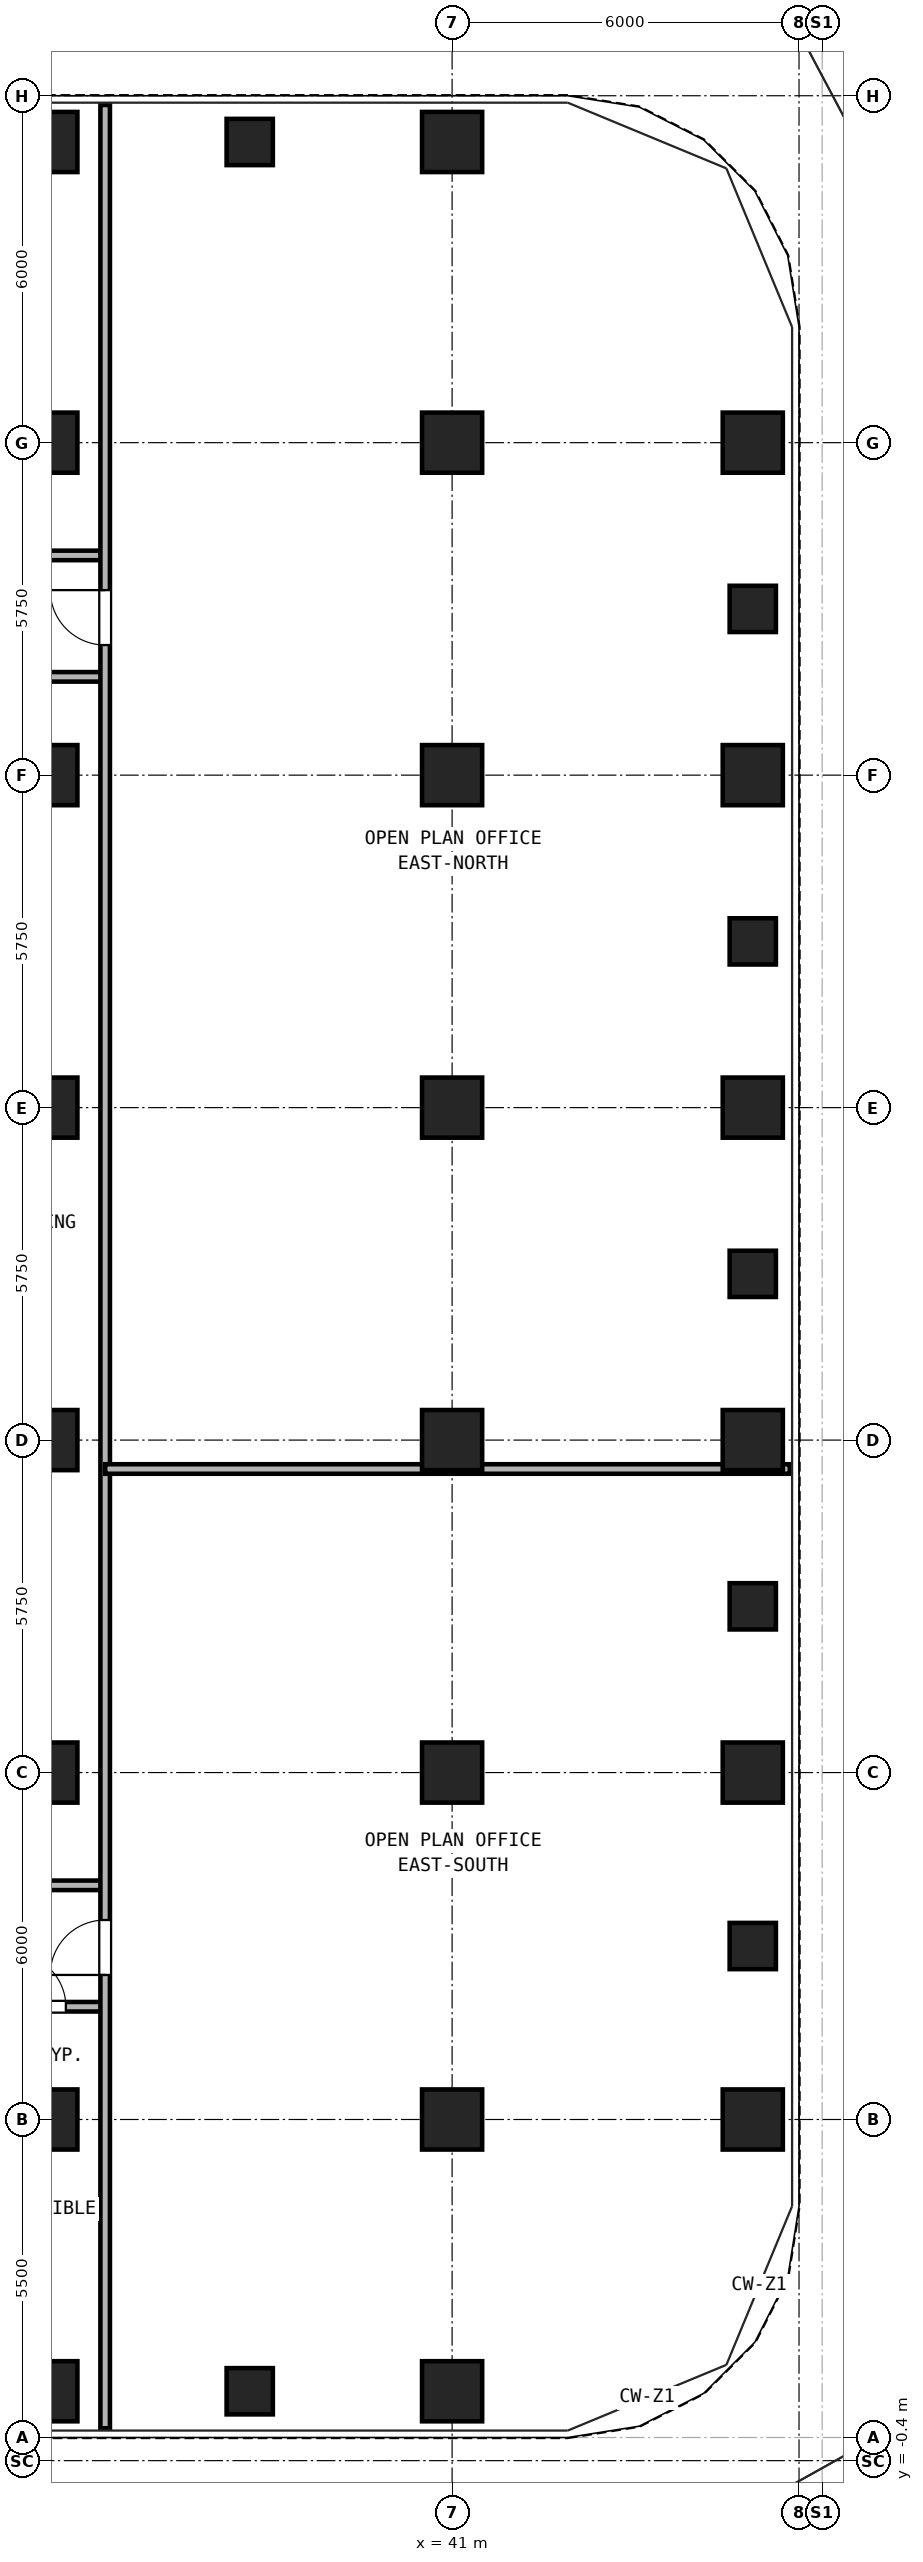
"""IFC4 building model, lengths in metres.
Left out: names, types, materials, properties, quantities, classifications, styles, units other than length and angle.
Written with IfcOpenShell. Run it as: python <this file> out.ifc"""

import sys

from ifc_helpers import new_model, si_unit, direction, frame, frame_2d, origin, origin_2d, place, context, subcontext, project, spatial, rectangle, hollow_rectangle, extrude, source, transform, mapped, element, fill, save


model = new_model("IFC4")
c1 = context("Model", 3, precision=1e-05, world=origin(), true_north=direction((0.0, 1.0)))
c2 = subcontext(c1, "Body", "Model", "MODEL_VIEW")
j1 = project(units=[si_unit("LENGTHUNIT", "METRE"), si_unit("PLANEANGLEUNIT", "RADIAN")], contexts=[c1])
p1 = place(None, origin())
s1 = spatial("IfcSite", under=j1, at=p1, CompositionType="ELEMENT")
p2 = place(p1, origin())
s2 = spatial("IfcBuilding", under=s1, at=p2, CompositionType="ELEMENT")
p3 = place(p2, frame((0.0, 0.0, 58.5)))
s3 = spatial("IfcBuildingStorey", under=s2, at=p3, CompositionType="ELEMENT", Elevation=58.5)
m1 = source(origin(), c2, "Body", "SweptSolid", [
    extrude(hollow_rectangle(XDim=1.04, YDim=1.04, WallThickness=0.065, at=origin_2d()), origin(), (0.0, 0.0, 1.0), 3.32),
])
for number, where, z_axis, x_axis in (
    (1, (34.0, 0.8, 0.0), (0.0, 0.0, 1.0), (1.0, 0.0, 0.0)),
    (2, (34.0, 39.7, 0.0), (0.0, 0.0, 1.0), (1.0, 0.0, 0.0)),
    (3, (41.0, 0.8, 0.0), (0.0, 0.0, 1.0), (1.0, 0.0, 0.0)),
    (4, (41.0, 39.7, 0.0), (0.0, 0.0, 1.0), (1.0, 0.0, 0.0)),
    (5, (46.2, 5.5, 0.0), (0.0, 0.0, 1.0), (1.0, 0.0, 0.0)),
    (6, (46.2, 11.5, 0.0), (0.0, 0.0, 1.0), (1.0, 0.0, 0.0)),
    (7, (46.2, 17.25, 0.0), (0.0, 0.0, 1.0), (1.0, 0.0, 0.0)),
    (8, (46.2, 23.0, 0.0), (0.0, 0.0, 1.0), (1.0, 0.0, 0.0)),
    (9, (46.2, 28.75, 0.0), (0.0, 0.0, 1.0), (1.0, 0.0, 0.0)),
    (10, (46.2, 34.5, 0.0), (0.0, 0.0, 1.0), (1.0, 0.0, 0.0)),
    (11, (34.0, 5.5, 0.0), (0.0, 0.0, 1.0), (1.0, 0.0, 0.0)),
    (12, (34.0, 11.5, 0.0), (0.0, 0.0, 1.0), (1.0, 0.0, 0.0)),
    (13, (34.0, 17.25, 0.0), (0.0, 0.0, 1.0), (1.0, 0.0, 0.0)),
    (14, (34.0, 23.0, 0.0), (0.0, 0.0, 1.0), (1.0, 0.0, 0.0)),
    (15, (34.0, 28.75, 0.0), (0.0, 0.0, 1.0), (1.0, 0.0, 0.0)),
    (16, (34.0, 34.5, 0.0), (0.0, 0.0, 1.0), (1.0, 0.0, 0.0)),
    (17, (41.0, 5.5, 0.0), (0.0, 0.0, 1.0), (1.0, 0.0, 0.0)),
    (18, (41.0, 11.5, 0.0), (0.0, 0.0, 1.0), (1.0, 0.0, 0.0)),
    (19, (41.0, 17.25, 0.0), (0.0, 0.0, 1.0), (1.0, 0.0, 0.0)),
    (20, (41.0, 23.0, 0.0), (0.0, 0.0, 1.0), (1.0, 0.0, 0.0)),
    (21, (41.0, 28.75, 0.0), (0.0, 0.0, 1.0), (1.0, 0.0, 0.0)),
    (22, (41.0, 34.5, 0.0), (0.0, 0.0, 1.0), (1.0, 0.0, 0.0)),
):
    element("IfcColumn", number, at=place(p3, frame(where, z_axis=z_axis, x_axis=x_axis)), inside=s3, PredefinedType="COLUMN", context=c2, shape_type="MappedRepresentation", body=[
        mapped(m1, transform((0.0, 0.0, 0.0), x_axis=(1.0, 0.0, 0.0), y_axis=(0.0, 1.0, 0.0), z_axis=(0.0, 0.0, 1.0), scale=1.0)),
    ])
m2 = source(origin(), c2, "Body", "SweptSolid", [
    extrude(hollow_rectangle(XDim=0.8, YDim=0.8, WallThickness=0.045, at=origin_2d()), origin(), (0.0, 0.0, 1.0), 3.32),
])
for number, where, z_axis, x_axis in (
    (23, (37.5, 0.8, 0.0), (0.0, 0.0, 1.0), (1.0, 0.0, 0.0)),
    (24, (37.5, 39.7, 0.0), (0.0, 0.0, 1.0), (1.0, 0.0, 0.0)),
    (25, (46.2, 8.5, 0.0), (0.0, 0.0, 1.0), (1.0, 0.0, 0.0)),
    (26, (46.2, 14.375, 0.0), (0.0, 0.0, 1.0), (1.0, 0.0, 0.0)),
    (27, (46.2, 20.125, 0.0), (0.0, 0.0, 1.0), (1.0, 0.0, 0.0)),
    (28, (46.2, 25.875, 0.0), (0.0, 0.0, 1.0), (1.0, 0.0, 0.0)),
    (29, (46.2, 31.625, 0.0), (0.0, 0.0, 1.0), (1.0, 0.0, 0.0)),
):
    element("IfcColumn", number, at=place(p3, frame(where, z_axis=z_axis, x_axis=x_axis)), inside=s3, PredefinedType="COLUMN", context=c2, shape_type="MappedRepresentation", body=[
        mapped(m2, transform((0.0, 0.0, 0.0), x_axis=(1.0, 0.0, 0.0), y_axis=(0.0, 1.0, 0.0), z_axis=(0.0, 0.0, 1.0), scale=1.0)),
    ])
p4 = place(p3, frame((12.0, 7.45, 0.0), z_axis=(0.0, 0.0, 1.0), x_axis=(1.0, 0.0, 0.0)))
e30 = element("IfcWall", 30, at=p4, inside=s3, PredefinedType="PARTITIONING", context=c2, shape_type="SweptSolid", body=[
    extrude(rectangle(XDim=23.0, YDim=0.165, at=frame_2d((11.5, 0.0))), origin(), (0.0, 0.0, 1.0), 3.32),
])
p5 = place(p4, frame((7.5, 0.0, 0.0)))
e31 = element("IfcOpeningElement", 31, at=p5, cuts=e30, PredefinedType="OPENING", context=c2, shape_type="SweptSolid", body=[
    extrude(rectangle(XDim=0.95, YDim=2.15, at=frame_2d((0.475, 1.075))), frame((0.0, 0.093, 0.0), z_axis=(0.0, -1.0, 0.0), x_axis=(1.0, 0.0, 0.0)), (0.0, 0.0, 1.0), 0.185),
])
p6 = place(p4, frame((17.9, 0.0, 0.0)))
e32 = element("IfcOpeningElement", 32, at=p6, cuts=e30, PredefinedType="OPENING", context=c2, shape_type="SweptSolid", body=[
    extrude(rectangle(XDim=0.95, YDim=2.15, at=frame_2d((0.475, 1.075))), frame((0.0, 0.093, 0.0), z_axis=(0.0, -1.0, 0.0), x_axis=(1.0, 0.0, 0.0)), (0.0, 0.0, 1.0), 0.185),
])
p7 = place(p4, frame((21.4, 0.0, 0.0)))
e33 = element("IfcOpeningElement", 33, at=p7, cuts=e30, PredefinedType="OPENING", context=c2, shape_type="SweptSolid", body=[
    extrude(rectangle(XDim=0.92, YDim=2.1, at=frame_2d((0.46, 1.05))), frame((0.0, 0.093, 0.0), z_axis=(0.0, -1.0, 0.0), x_axis=(1.0, 0.0, 0.0)), (0.0, 0.0, 1.0), 0.185),
])
p8 = place(p3, frame((12.0, 32.55, 0.0), z_axis=(0.0, 0.0, 1.0), x_axis=(1.0, 0.0, 0.0)))
e34 = element("IfcWall", 34, at=p8, inside=s3, PredefinedType="PARTITIONING", context=c2, shape_type="SweptSolid", body=[
    extrude(rectangle(XDim=23.0, YDim=0.165, at=frame_2d((11.5, 0.0))), origin(), (0.0, 0.0, 1.0), 3.32),
])
p9 = place(p8, frame((5.75, 0.0, 0.0)))
e35 = element("IfcOpeningElement", 35, at=p9, cuts=e34, PredefinedType="OPENING", context=c2, shape_type="SweptSolid", body=[
    extrude(rectangle(XDim=0.95, YDim=2.15, at=frame_2d((0.475, 1.075))), frame((0.0, 0.093, 0.0), z_axis=(0.0, -1.0, 0.0), x_axis=(1.0, 0.0, 0.0)), (0.0, 0.0, 1.0), 0.185),
])
p10 = place(p8, frame((17.25, 0.0, 0.0)))
e36 = element("IfcOpeningElement", 36, at=p10, cuts=e34, PredefinedType="OPENING", context=c2, shape_type="SweptSolid", body=[
    extrude(rectangle(XDim=0.95, YDim=2.15, at=frame_2d((0.475, 1.075))), frame((0.0, 0.093, 0.0), z_axis=(0.0, -1.0, 0.0), x_axis=(1.0, 0.0, 0.0)), (0.0, 0.0, 1.0), 0.185),
])
for number, where, z_axis, x_axis in (
    (37, (30.7, 9.55, 0.0), (0.0, 0.0, 1.0), (1.0, 0.0, 0.0)),
    (38, (30.7, 30.45, 0.0), (0.0, 0.0, 1.0), (1.0, 0.0, 0.0)),
):
    element("IfcWall", number, at=place(p3, frame(where, z_axis=z_axis, x_axis=x_axis)), inside=s3, PredefinedType="PARTITIONING", context=c2, shape_type="SweptSolid", body=[
        extrude(rectangle(XDim=4.3, YDim=0.165, at=frame_2d((2.15, 0.0))), origin(), (0.0, 0.0, 1.0), 3.32),
    ])
p11 = place(p3, frame((35.0, 0.16, 0.0), z_axis=(0.0, 0.0, 1.0), x_axis=(0.0, 1.0, 0.0)))
e39 = element("IfcWall", 39, at=p11, inside=s3, PredefinedType="PARTITIONING", context=c2, shape_type="SweptSolid", body=[
    extrude(rectangle(XDim=40.18, YDim=0.165, at=frame_2d((20.09, 0.0))), origin(), (0.0, 0.0, 1.0), 3.32),
])
p12 = place(p11, frame((7.84, 0.0, 0.0)))
e40 = element("IfcOpeningElement", 40, at=p12, cuts=e39, PredefinedType="OPENING", context=c2, shape_type="SweptSolid", body=[
    extrude(rectangle(XDim=0.95, YDim=2.15, at=frame_2d((0.475, 1.075))), frame((0.0, 0.093, 0.0), z_axis=(0.0, -1.0, 0.0), x_axis=(1.0, 0.0, 0.0)), (0.0, 0.0, 1.0), 0.185),
])
p13 = place(p11, frame((30.84, 0.0, 0.0)))
e41 = element("IfcOpeningElement", 41, at=p13, cuts=e39, PredefinedType="OPENING", context=c2, shape_type="SweptSolid", body=[
    extrude(rectangle(XDim=0.95, YDim=2.15, at=frame_2d((0.475, 1.075))), frame((0.0, 0.093, 0.0), z_axis=(0.0, -1.0, 0.0), x_axis=(1.0, 0.0, 0.0)), (0.0, 0.0, 1.0), 0.185),
])
p14 = place(p3, frame((35.0, 16.75, 0.0), z_axis=(0.0, 0.0, 1.0), x_axis=(1.0, 0.0, 0.0)))
e42 = element("IfcWall", 42, at=p14, inside=s3, PredefinedType="PARTITIONING", context=c2, shape_type="SweptSolid", body=[
    extrude(rectangle(XDim=11.84, YDim=0.165, at=frame_2d((5.92, 0.0))), origin(), (0.0, 0.0, 1.0), 3.32),
])
p15 = place(p7, frame((0.92, 0.0, 0.0), z_axis=(0.0, 0.0, 1.0), x_axis=(-1.0, 0.0, 0.0)))
e43 = element("IfcDoor", 43, at=p15, inside=s3, OperationType="SINGLE_SWING_LEFT", PredefinedType="DOOR", context=c2, shape_type="SweptSolid", body=[
    extrude(rectangle(XDim=0.92, YDim=2.1, at=frame_2d((0.46, 1.05))), frame((0.0, 0.025, 0.0), z_axis=(0.0, -1.0, 0.0), x_axis=(1.0, 0.0, 0.0)), (0.0, 0.0, 1.0), 0.05),
])
fill(e33, e43)
p16 = place(p12, origin())
e44 = element("IfcDoor", 44, at=p16, inside=s3, OperationType="SINGLE_SWING_LEFT", PredefinedType="DOOR", context=c2, shape_type="SweptSolid", body=[
    extrude(rectangle(XDim=0.95, YDim=2.15, at=frame_2d((0.475, 1.075))), frame((0.0, 0.025, 0.0), z_axis=(0.0, -1.0, 0.0), x_axis=(1.0, 0.0, 0.0)), (0.0, 0.0, 1.0), 0.05),
])
fill(e40, e44)
p17 = place(p13, origin())
e45 = element("IfcDoor", 45, at=p17, inside=s3, OperationType="SINGLE_SWING_RIGHT", PredefinedType="DOOR", context=c2, shape_type="SweptSolid", body=[
    extrude(rectangle(XDim=0.95, YDim=2.15, at=frame_2d((0.475, 1.075))), frame((0.0, 0.025, 0.0), z_axis=(0.0, -1.0, 0.0), x_axis=(1.0, 0.0, 0.0)), (0.0, 0.0, 1.0), 0.05),
])
fill(e41, e45)
save(model, sys.argv[1])
